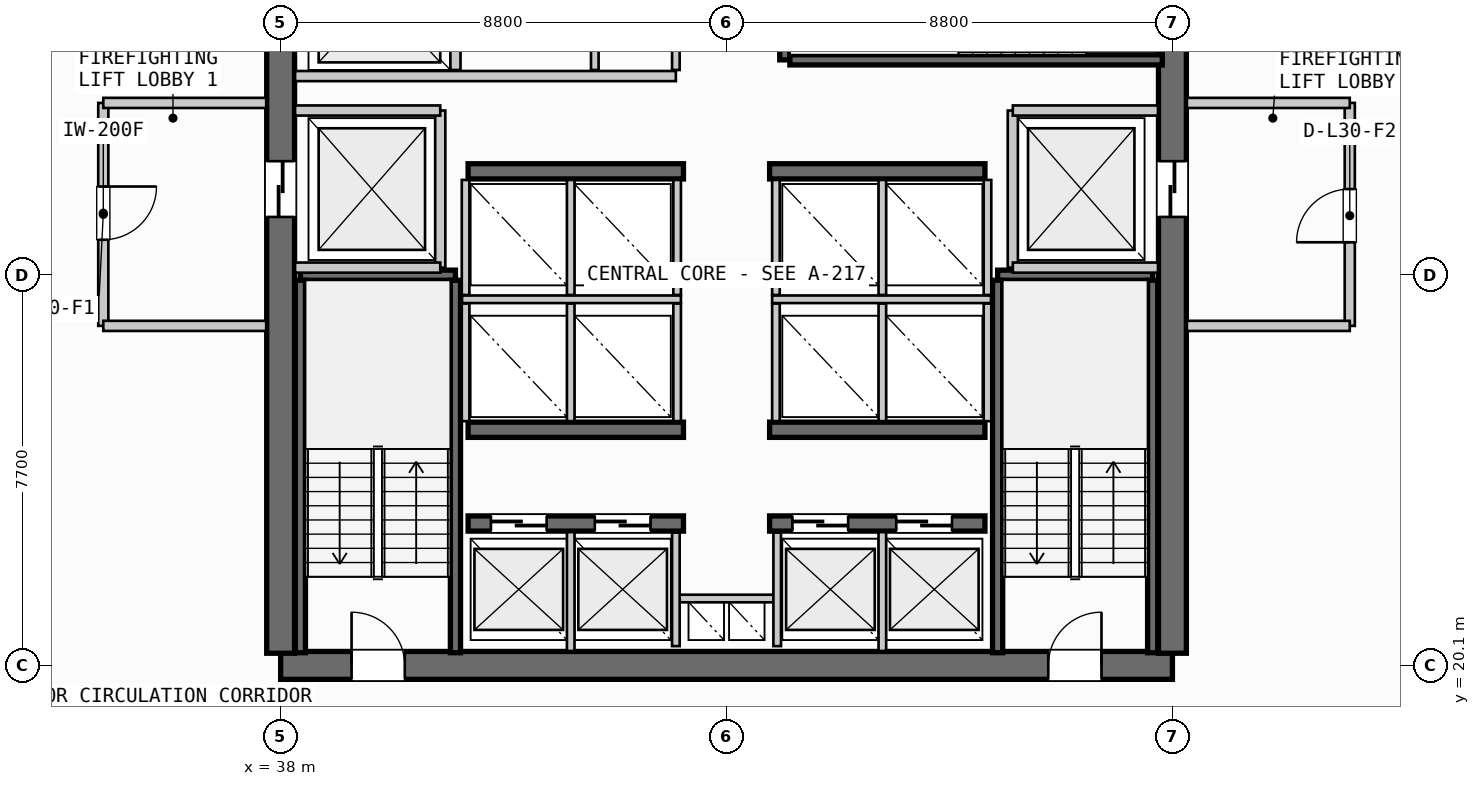
"""IFC4 building model, lengths in metres.
Left out: names, types, materials, properties, quantities, classifications, styles, units other than length and angle.
Written with IfcOpenShell. Run it as: python <this file> out.ifc"""

import sys

from ifc_helpers import new_model, si_unit, direction, frame, frame_2d, origin, place, context, subcontext, project, spatial, rectangle, extrude, source, transform, mapped, element, fill, save


model = new_model("IFC4")
c1 = context("Model", 3, precision=1e-05, world=origin(), true_north=direction((0.0, 1.0)))
c2 = subcontext(c1, "Body", "Model", "MODEL_VIEW")
j1 = project(units=[si_unit("LENGTHUNIT", "METRE"), si_unit("PLANEANGLEUNIT", "RADIAN")], contexts=[c1])
p1 = place(None, origin())
s1 = spatial("IfcSite", under=j1, at=p1, CompositionType="ELEMENT")
p2 = place(p1, origin())
s2 = spatial("IfcBuilding", under=s1, at=p2, CompositionType="ELEMENT")
p3 = place(p2, frame((0.0, 0.0, 121.6)))
s3 = spatial("IfcBuildingStorey", under=s2, at=p3, CompositionType="ELEMENT", Elevation=121.6)
p4 = place(p3, frame((38.0, 20.1, 0.0), z_axis=(0.0, 0.0, 1.0), x_axis=(1.0, 0.0, 0.0)))
e1 = element("IfcWall", 1, at=p4, inside=s3, PredefinedType="SHEAR", context=c2, shape_type="SweptSolid", body=[
    extrude(rectangle(XDim=17.6, YDim=0.55, at=frame_2d((8.8, 0.0))), origin(), (0.0, 0.0, 1.0), 3.35),
])
p5 = place(p4, frame((1.4, 0.0, 0.0)))
e2 = element("IfcOpeningElement", 2, at=p5, cuts=e1, PredefinedType="OPENING", context=c2, shape_type="SweptSolid", body=[
    extrude(rectangle(XDim=1.05, YDim=2.15, at=frame_2d((0.525, 1.075))), frame((0.0, 0.285, 0.0), z_axis=(0.0, -1.0, 0.0), x_axis=(1.0, 0.0, 0.0)), (0.0, 0.0, 1.0), 0.57),
])
p6 = place(p4, frame((15.15, 0.0, 0.0)))
e3 = element("IfcOpeningElement", 3, at=p6, cuts=e1, PredefinedType="OPENING", context=c2, shape_type="SweptSolid", body=[
    extrude(rectangle(XDim=1.05, YDim=2.15, at=frame_2d((0.525, 1.075))), frame((0.0, 0.285, 0.0), z_axis=(0.0, -1.0, 0.0), x_axis=(1.0, 0.0, 0.0)), (0.0, 0.0, 1.0), 0.57),
])
p7 = place(p3, frame((38.0, 35.26, 0.0), z_axis=(0.0, 0.0, 1.0), x_axis=(0.0, -1.0, 0.0)))
e4 = element("IfcWall", 4, at=p7, inside=s3, PredefinedType="SHEAR", context=c2, shape_type="SweptSolid", body=[
    extrude(rectangle(XDim=14.92, YDim=0.55, at=frame_2d((7.46, 0.0))), origin(), (0.0, 0.0, 1.0), 3.35),
])
p8 = place(p7, frame((5.21, 0.0, 0.0)))
e5 = element("IfcOpeningElement", 5, at=p8, cuts=e4, PredefinedType="OPENING", context=c2, shape_type="SweptSolid", body=[
    extrude(rectangle(XDim=1.1, YDim=2.2, at=frame_2d((0.55, 1.1))), frame((0.0, 0.285, 0.0), z_axis=(0.0, -1.0, 0.0), x_axis=(1.0, 0.0, 0.0)), (0.0, 0.0, 1.0), 0.57),
])
p9 = place(p3, frame((55.6, 20.34, 0.0), z_axis=(0.0, 0.0, 1.0), x_axis=(0.0, 1.0, 0.0)))
e6 = element("IfcWall", 6, at=p9, inside=s3, PredefinedType="SHEAR", context=c2, shape_type="SweptSolid", body=[
    extrude(rectangle(XDim=14.92, YDim=0.55, at=frame_2d((7.46, 0.0))), origin(), (0.0, 0.0, 1.0), 3.35),
])
p10 = place(p9, frame((12.71, 0.0, 0.0)))
e7 = element("IfcOpeningElement", 7, at=p10, cuts=e6, PredefinedType="OPENING", context=c2, shape_type="SweptSolid", body=[
    extrude(rectangle(XDim=1.05, YDim=2.15, at=frame_2d((0.525, 1.075))), frame((0.0, 0.285, 0.0), z_axis=(0.0, -1.0, 0.0), x_axis=(1.0, 0.0, 0.0)), (0.0, 0.0, 1.0), 0.57),
])
p11 = place(p9, frame((8.61, 0.0, 0.0)))
e8 = element("IfcOpeningElement", 8, at=p11, cuts=e6, PredefinedType="OPENING", context=c2, shape_type="SweptSolid", body=[
    extrude(rectangle(XDim=1.1, YDim=2.2, at=frame_2d((0.55, 1.1))), frame((0.0, 0.285, 0.0), z_axis=(0.0, -1.0, 0.0), x_axis=(1.0, 0.0, 0.0)), (0.0, 0.0, 1.0), 0.57),
])
p12 = place(p3, frame((41.7, 22.9, 0.0), z_axis=(0.0, 0.0, 1.0), x_axis=(1.0, 0.0, 0.0)))
e9 = element("IfcWall", 9, at=p12, inside=s3, PredefinedType="SHEAR", context=c2, shape_type="SweptSolid", body=[
    extrude(rectangle(XDim=4.25, YDim=0.3, at=frame_2d((2.125, 0.0))), origin(), (0.0, 0.0, 1.0), 3.35),
])
p13 = place(p12, frame((0.45, 0.0, 0.0)))
e10 = element("IfcOpeningElement", 10, at=p13, cuts=e9, PredefinedType="OPENING", context=c2, shape_type="SweptSolid", body=[
    extrude(rectangle(XDim=1.1, YDim=2.2, at=frame_2d((0.55, 1.1))), frame((0.0, 0.16, 0.0), z_axis=(0.0, -1.0, 0.0), x_axis=(1.0, 0.0, 0.0)), (0.0, 0.0, 1.0), 0.32),
])
p14 = place(p12, frame((2.5, 0.0, 0.0)))
e11 = element("IfcOpeningElement", 11, at=p14, cuts=e9, PredefinedType="OPENING", context=c2, shape_type="SweptSolid", body=[
    extrude(rectangle(XDim=1.1, YDim=2.2, at=frame_2d((0.55, 1.1))), frame((0.0, 0.16, 0.0), z_axis=(0.0, -1.0, 0.0), x_axis=(1.0, 0.0, 0.0)), (0.0, 0.0, 1.0), 0.32),
])
p15 = place(p3, frame((47.65, 22.9, 0.0), z_axis=(0.0, 0.0, 1.0), x_axis=(1.0, 0.0, 0.0)))
e12 = element("IfcWall", 12, at=p15, inside=s3, PredefinedType="SHEAR", context=c2, shape_type="SweptSolid", body=[
    extrude(rectangle(XDim=4.25, YDim=0.3, at=frame_2d((2.125, 0.0))), origin(), (0.0, 0.0, 1.0), 3.35),
])
p16 = place(p15, frame((0.45, 0.0, 0.0)))
e13 = element("IfcOpeningElement", 13, at=p16, cuts=e12, PredefinedType="OPENING", context=c2, shape_type="SweptSolid", body=[
    extrude(rectangle(XDim=1.1, YDim=2.2, at=frame_2d((0.55, 1.1))), frame((0.0, 0.16, 0.0), z_axis=(0.0, -1.0, 0.0), x_axis=(1.0, 0.0, 0.0)), (0.0, 0.0, 1.0), 0.32),
])
p17 = place(p15, frame((2.5, 0.0, 0.0)))
e14 = element("IfcOpeningElement", 14, at=p17, cuts=e12, PredefinedType="OPENING", context=c2, shape_type="SweptSolid", body=[
    extrude(rectangle(XDim=1.1, YDim=2.2, at=frame_2d((0.55, 1.1))), frame((0.0, 0.16, 0.0), z_axis=(0.0, -1.0, 0.0), x_axis=(1.0, 0.0, 0.0)), (0.0, 0.0, 1.0), 0.32),
])
for number, where, z_axis, x_axis in (
    (15, (41.7, 24.75, 0.0), (0.0, 0.0, 1.0), (1.0, 0.0, 0.0)),
    (16, (47.65, 24.75, 0.0), (0.0, 0.0, 1.0), (1.0, 0.0, 0.0)),
    (17, (41.7, 29.85, 0.0), (0.0, 0.0, 1.0), (1.0, 0.0, 0.0)),
    (18, (47.65, 29.85, 0.0), (0.0, 0.0, 1.0), (1.0, 0.0, 0.0)),
):
    element("IfcWall", number, at=place(p3, frame(where, z_axis=z_axis, x_axis=x_axis)), inside=s3, PredefinedType="SHEAR", context=c2, shape_type="SweptSolid", body=[
        extrude(rectangle(XDim=4.25, YDim=0.3, at=frame_2d((2.125, 0.0))), origin(), (0.0, 0.0, 1.0), 3.35),
    ])
p18 = place(p3, frame((38.39, 27.8, 0.0), z_axis=(0.0, 0.0, 1.0), x_axis=(1.0, 0.0, 0.0)))
e19 = element("IfcWall", 19, at=p18, inside=s3, PredefinedType="SHEAR", context=c2, shape_type="SweptSolid", body=[
    extrude(rectangle(XDim=3.06, YDim=0.2, at=frame_2d((1.53, 0.0))), origin(), (0.0, 0.0, 1.0), 3.35),
])
for number, where, z_axis, x_axis in (
    (20, (41.45, 27.7, 0.0), (0.0, 0.0, 1.0), (0.0, -1.0, 0.0)),
    (21, (38.39, 20.35, 0.0), (0.0, 0.0, 1.0), (0.0, 1.0, 0.0)),
):
    element("IfcWall", number, at=place(p3, frame(where, z_axis=z_axis, x_axis=x_axis)), inside=s3, PredefinedType="SHEAR", context=c2, shape_type="SweptSolid", body=[
        extrude(rectangle(XDim=7.35, YDim=0.2, at=frame_2d((3.675, 0.0))), origin(), (0.0, 0.0, 1.0), 3.35),
    ])
p19 = place(p3, frame((52.15, 27.8, 0.0), z_axis=(0.0, 0.0, 1.0), x_axis=(1.0, 0.0, 0.0)))
e22 = element("IfcWall", 22, at=p19, inside=s3, PredefinedType="SHEAR", context=c2, shape_type="SweptSolid", body=[
    extrude(rectangle(XDim=3.06, YDim=0.2, at=frame_2d((1.53, 0.0))), origin(), (0.0, 0.0, 1.0), 3.35),
])
for number, where, z_axis, x_axis in (
    (23, (55.21, 27.7, 0.0), (0.0, 0.0, 1.0), (0.0, -1.0, 0.0)),
    (24, (52.15, 20.35, 0.0), (0.0, 0.0, 1.0), (0.0, 1.0, 0.0)),
):
    element("IfcWall", number, at=place(p3, frame(where, z_axis=z_axis, x_axis=x_axis)), inside=s3, PredefinedType="SHEAR", context=c2, shape_type="SweptSolid", body=[
        extrude(rectangle(XDim=7.35, YDim=0.2, at=frame_2d((3.675, 0.0))), origin(), (0.0, 0.0, 1.0), 3.35),
    ])
p20 = place(p3, frame((47.95, 32.05, 0.0), z_axis=(0.0, 0.0, 1.0), x_axis=(0.0, 1.0, 0.0)))
e25 = element("IfcWall", 25, at=p20, inside=s3, PredefinedType="SHEAR", context=c2, shape_type="SweptSolid", body=[
    extrude(rectangle(XDim=3.06, YDim=0.2, at=frame_2d((1.53, 0.0))), origin(), (0.0, 0.0, 1.0), 3.35),
])
p21 = place(p3, frame((55.4, 32.05, 0.0), z_axis=(0.0, 0.0, 1.0), x_axis=(-1.0, 0.0, 0.0)))
e26 = element("IfcWall", 26, at=p21, inside=s3, PredefinedType="SHEAR", context=c2, shape_type="SweptSolid", body=[
    extrude(rectangle(XDim=7.35, YDim=0.2, at=frame_2d((3.675, 0.0))), origin(), (0.0, 0.0, 1.0), 3.35),
])
p22 = place(p3, frame((45.8, 21.42, 0.0), z_axis=(0.0, 0.0, 1.0), x_axis=(1.0, 0.0, 0.0)))
e27 = element("IfcWall", 27, at=p22, inside=s3, PredefinedType="PARTITIONING", context=c2, shape_type="SweptSolid", body=[
    extrude(rectangle(XDim=2.0, YDim=0.15, at=frame_2d((1.0, 0.0))), origin(), (0.0, 0.0, 1.0), 2.775),
])
for number, where, z_axis, x_axis in (
    (28, (45.8, 20.48, 0.0), (0.0, 0.0, 1.0), (0.0, 1.0, 0.0)),
    (29, (47.8, 20.48, 0.0), (0.0, 0.0, 1.0), (0.0, 1.0, 0.0)),
):
    element("IfcWall", number, at=place(p3, frame(where, z_axis=z_axis, x_axis=x_axis)), inside=s3, PredefinedType="PARTITIONING", context=c2, shape_type="SweptSolid", body=[
        extrude(rectangle(XDim=2.24, YDim=0.15, at=frame_2d((1.12, 0.0))), origin(), (0.0, 0.0, 1.0), 2.775),
    ])
p23 = place(p3, frame((41.15, 27.95, 0.0), z_axis=(0.0, 0.0, 1.0), x_axis=(0.0, 1.0, 0.0)))
e30 = element("IfcWall", 30, at=p23, inside=s3, PredefinedType="PARTITIONING", context=c2, shape_type="SweptSolid", body=[
    extrude(rectangle(XDim=3.1, YDim=0.2, at=frame_2d((1.55, 0.0))), origin(), (0.0, 0.0, 1.0), 2.775),
])
for number, where, z_axis, x_axis in (
    (31, (38.285, 27.95, 0.0), (0.0, 0.0, 1.0), (1.0, 0.0, 0.0)),
    (32, (38.285, 31.05, 0.0), (0.0, 0.0, 1.0), (1.0, 0.0, 0.0)),
):
    element("IfcWall", number, at=place(p3, frame(where, z_axis=z_axis, x_axis=x_axis)), inside=s3, PredefinedType="PARTITIONING", context=c2, shape_type="SweptSolid", body=[
        extrude(rectangle(XDim=2.865, YDim=0.2, at=frame_2d((1.433, 0.0))), origin(), (0.0, 0.0, 1.0), 2.775),
    ])
p24 = place(p3, frame((34.5, 31.2, 0.0), z_axis=(0.0, 0.0, 1.0), x_axis=(0.0, -1.0, 0.0)))
e33 = element("IfcWall", 33, at=p24, inside=s3, PredefinedType="PARTITIONING", context=c2, shape_type="SweptSolid", body=[
    extrude(rectangle(XDim=4.4, YDim=0.2, at=frame_2d((2.2, 0.0))), origin(), (0.0, 0.0, 1.0), 2.775),
])
p25 = place(p24, frame((1.65, 0.0, 0.0)))
e34 = element("IfcOpeningElement", 34, at=p25, cuts=e33, PredefinedType="OPENING", context=c2, shape_type="SweptSolid", body=[
    extrude(rectangle(XDim=1.05, YDim=2.15, at=frame_2d((0.525, 1.075))), frame((0.0, 0.11, 0.0), z_axis=(0.0, -1.0, 0.0), x_axis=(1.0, 0.0, 0.0)), (0.0, 0.0, 1.0), 0.22),
])
for number, where, z_axis, x_axis in (
    (35, (34.5, 26.8, 0.0), (0.0, 0.0, 1.0), (1.0, 0.0, 0.0)),
    (36, (34.5, 31.2, 0.0), (0.0, 0.0, 1.0), (1.0, 0.0, 0.0)),
):
    element("IfcWall", number, at=place(p3, frame(where, z_axis=z_axis, x_axis=x_axis)), inside=s3, PredefinedType="PARTITIONING", context=c2, shape_type="SweptSolid", body=[
        extrude(rectangle(XDim=3.215, YDim=0.2, at=frame_2d((1.607, 0.0))), origin(), (0.0, 0.0, 1.0), 2.775),
    ])
p26 = place(p3, frame((52.45, 27.95, 0.0), z_axis=(0.0, 0.0, 1.0), x_axis=(0.0, 1.0, 0.0)))
e37 = element("IfcWall", 37, at=p26, inside=s3, PredefinedType="PARTITIONING", context=c2, shape_type="SweptSolid", body=[
    extrude(rectangle(XDim=3.1, YDim=0.2, at=frame_2d((1.55, 0.0))), origin(), (0.0, 0.0, 1.0), 2.775),
])
for number, where, z_axis, x_axis in (
    (38, (52.45, 27.95, 0.0), (0.0, 0.0, 1.0), (1.0, 0.0, 0.0)),
    (39, (52.45, 31.05, 0.0), (0.0, 0.0, 1.0), (1.0, 0.0, 0.0)),
):
    element("IfcWall", number, at=place(p3, frame(where, z_axis=z_axis, x_axis=x_axis)), inside=s3, PredefinedType="PARTITIONING", context=c2, shape_type="SweptSolid", body=[
        extrude(rectangle(XDim=2.865, YDim=0.2, at=frame_2d((1.433, 0.0))), origin(), (0.0, 0.0, 1.0), 2.775),
    ])
p27 = place(p3, frame((59.1, 26.8, 0.0), z_axis=(0.0, 0.0, 1.0), x_axis=(0.0, 1.0, 0.0)))
e40 = element("IfcWall", 40, at=p27, inside=s3, PredefinedType="PARTITIONING", context=c2, shape_type="SweptSolid", body=[
    extrude(rectangle(XDim=4.4, YDim=0.2, at=frame_2d((2.2, 0.0))), origin(), (0.0, 0.0, 1.0), 2.775),
])
p28 = place(p27, frame((1.65, 0.0, 0.0)))
e41 = element("IfcOpeningElement", 41, at=p28, cuts=e40, PredefinedType="OPENING", context=c2, shape_type="SweptSolid", body=[
    extrude(rectangle(XDim=1.05, YDim=2.15, at=frame_2d((0.525, 1.075))), frame((0.0, 0.11, 0.0), z_axis=(0.0, -1.0, 0.0), x_axis=(1.0, 0.0, 0.0)), (0.0, 0.0, 1.0), 0.22),
])
for number, where, z_axis, x_axis in (
    (42, (55.885, 26.8, 0.0), (0.0, 0.0, 1.0), (1.0, 0.0, 0.0)),
    (43, (55.885, 31.2, 0.0), (0.0, 0.0, 1.0), (1.0, 0.0, 0.0)),
):
    element("IfcWall", number, at=place(p3, frame(where, z_axis=z_axis, x_axis=x_axis)), inside=s3, PredefinedType="PARTITIONING", context=c2, shape_type="SweptSolid", body=[
        extrude(rectangle(XDim=3.215, YDim=0.2, at=frame_2d((1.607, 0.0))), origin(), (0.0, 0.0, 1.0), 2.775),
    ])
for number, where, z_axis, x_axis in (
    (44, (43.725, 20.385, 0.0), (0.0, 0.0, 1.0), (0.0, 1.0, 0.0)),
    (45, (49.875, 20.385, 0.0), (0.0, 0.0, 1.0), (0.0, 1.0, 0.0)),
):
    element("IfcWall", number, at=place(p3, frame(where, z_axis=z_axis, x_axis=x_axis)), inside=s3, PredefinedType="PARTITIONING", context=c2, shape_type="SweptSolid", body=[
        extrude(rectangle(XDim=2.345, YDim=0.15, at=frame_2d((1.172, 0.0))), origin(), (0.0, 0.0, 1.0), 2.775),
    ])
p29 = place(p3, frame((41.58, 27.325, 0.0), z_axis=(0.0, 0.0, 1.0), x_axis=(1.0, 0.0, 0.0)))
e46 = element("IfcWall", 46, at=p29, inside=s3, PredefinedType="PARTITIONING", context=c2, shape_type="SweptSolid", body=[
    extrude(rectangle(XDim=4.32, YDim=0.15, at=frame_2d((2.16, 0.0))), origin(), (0.0, 0.0, 1.0), 2.775),
])
p30 = place(p3, frame((47.7, 27.325, 0.0), z_axis=(0.0, 0.0, 1.0), x_axis=(1.0, 0.0, 0.0)))
e47 = element("IfcWall", 47, at=p30, inside=s3, PredefinedType="PARTITIONING", context=c2, shape_type="SweptSolid", body=[
    extrude(rectangle(XDim=4.32, YDim=0.15, at=frame_2d((2.16, 0.0))), origin(), (0.0, 0.0, 1.0), 2.775),
])
for number, where, z_axis, x_axis in (
    (48, (41.65, 24.92, 0.0), (0.0, 0.0, 1.0), (0.0, 1.0, 0.0)),
    (49, (43.725, 24.92, 0.0), (0.0, 0.0, 1.0), (0.0, 1.0, 0.0)),
    (50, (45.825, 24.92, 0.0), (0.0, 0.0, 1.0), (0.0, 1.0, 0.0)),
    (51, (47.775, 24.92, 0.0), (0.0, 0.0, 1.0), (0.0, 1.0, 0.0)),
    (52, (49.875, 24.92, 0.0), (0.0, 0.0, 1.0), (0.0, 1.0, 0.0)),
    (53, (51.95, 24.92, 0.0), (0.0, 0.0, 1.0), (0.0, 1.0, 0.0)),
):
    element("IfcWall", number, at=place(p3, frame(where, z_axis=z_axis, x_axis=x_axis)), inside=s3, PredefinedType="PARTITIONING", context=c2, shape_type="SweptSolid", body=[
        extrude(rectangle(XDim=2.32, YDim=0.15, at=frame_2d((1.16, 0.0))), origin(), (0.0, 0.0, 1.0), 2.775),
    ])
for number, where, z_axis, x_axis in (
    (54, (41.65, 27.41, 0.0), (0.0, 0.0, 1.0), (0.0, 1.0, 0.0)),
    (55, (43.725, 27.41, 0.0), (0.0, 0.0, 1.0), (0.0, 1.0, 0.0)),
    (56, (45.825, 27.41, 0.0), (0.0, 0.0, 1.0), (0.0, 1.0, 0.0)),
    (57, (47.775, 27.41, 0.0), (0.0, 0.0, 1.0), (0.0, 1.0, 0.0)),
    (58, (49.875, 27.41, 0.0), (0.0, 0.0, 1.0), (0.0, 1.0, 0.0)),
    (59, (51.95, 27.41, 0.0), (0.0, 0.0, 1.0), (0.0, 1.0, 0.0)),
):
    element("IfcWall", number, at=place(p3, frame(where, z_axis=z_axis, x_axis=x_axis)), inside=s3, PredefinedType="PARTITIONING", context=c2, shape_type="SweptSolid", body=[
        extrude(rectangle(XDim=2.27, YDim=0.15, at=frame_2d((1.135, 0.0))), origin(), (0.0, 0.0, 1.0), 2.775),
    ])
p31 = place(p3, frame((41.45, 31.85, 0.0), z_axis=(0.0, 0.0, 1.0), x_axis=(0.0, 1.0, 0.0)))
e60 = element("IfcWall", 60, at=p31, inside=s3, PredefinedType="PARTITIONING", context=c2, shape_type="SweptSolid", body=[
    extrude(rectangle(XDim=3.365, YDim=0.2, at=frame_2d((1.683, 0.0))), origin(), (0.0, 0.0, 1.0), 2.775),
])
p32 = place(p3, frame((38.285, 31.73, 0.0), z_axis=(0.0, 0.0, 1.0), x_axis=(1.0, 0.0, 0.0)))
e61 = element("IfcWall", 61, at=p32, inside=s3, PredefinedType="PARTITIONING", context=c2, shape_type="SweptSolid", body=[
    extrude(rectangle(XDim=7.515, YDim=0.2, at=frame_2d((3.758, 0.0))), origin(), (0.0, 0.0, 1.0), 2.775),
])
p33 = place(p3, frame((45.8, 31.85, 0.0), z_axis=(0.0, 0.0, 1.0), x_axis=(0.0, 1.0, 0.0)))
e62 = element("IfcWall", 62, at=p33, inside=s3, PredefinedType="PARTITIONING", context=c2, shape_type="SweptSolid", body=[
    extrude(rectangle(XDim=3.365, YDim=0.15, at=frame_2d((1.683, 0.0))), origin(), (0.0, 0.0, 1.0), 2.775),
])
p34 = place(p3, frame((44.2, 31.85, 0.0), z_axis=(0.0, 0.0, 1.0), x_axis=(0.0, 1.0, 0.0)))
e63 = element("IfcWall", 63, at=p34, inside=s3, PredefinedType="PLUMBINGWALL", context=c2, shape_type="SweptSolid", body=[
    extrude(rectangle(XDim=3.365, YDim=0.15, at=frame_2d((1.683, 0.0))), origin(), (0.0, 0.0, 1.0), 2.775),
])
m1 = source(origin(), c2, "Body", "SweptSolid", [
    extrude(rectangle(XDim=1.05, YDim=2.15, at=frame_2d((0.525, 1.075))), frame((0.0, 0.025, 0.0), z_axis=(0.0, -1.0, 0.0), x_axis=(1.0, 0.0, 0.0)), (0.0, 0.0, 1.0), 0.05),
])
p35 = place(p5, origin())
e64 = element("IfcDoor", 64, at=p35, inside=s3, OperationType="SINGLE_SWING_LEFT", PredefinedType="DOOR", context=c2, shape_type="MappedRepresentation", body=[
    mapped(m1, transform((0.0, 0.0, 0.0), scale=1.0)),
])
fill(e2, e64)
p36 = place(p6, origin())
e65 = element("IfcDoor", 65, at=p36, inside=s3, OperationType="SINGLE_SWING_RIGHT", PredefinedType="DOOR", context=c2, shape_type="MappedRepresentation", body=[
    mapped(m1, transform((0.0, 0.0, 0.0), scale=1.0)),
])
fill(e3, e65)
m2 = source(origin(), c2, "Body", "SweptSolid", [
    extrude(rectangle(XDim=1.1, YDim=2.2, at=frame_2d((0.55, 1.1))), frame((0.0, 0.025, 0.0), z_axis=(0.0, -1.0, 0.0), x_axis=(1.0, 0.0, 0.0)), (0.0, 0.0, 1.0), 0.05),
])
p37 = place(p8, origin())
e66 = element("IfcDoor", 66, at=p37, inside=s3, OperationType="SLIDING_TO_LEFT", PredefinedType="DOOR", context=c2, shape_type="MappedRepresentation", body=[
    mapped(m2, transform((0.0, 0.0, 0.0), scale=1.0)),
])
fill(e5, e66)
p38 = place(p11, origin())
e67 = element("IfcDoor", 67, at=p38, inside=s3, OperationType="SLIDING_TO_RIGHT", PredefinedType="DOOR", context=c2, shape_type="MappedRepresentation", body=[
    mapped(m2, transform((0.0, 0.0, 0.0), scale=1.0)),
])
fill(e8, e67)
p39 = place(p13, origin())
e68 = element("IfcDoor", 68, at=p39, inside=s3, OperationType="SLIDING_TO_LEFT", PredefinedType="DOOR", context=c2, shape_type="MappedRepresentation", body=[
    mapped(m2, transform((0.0, 0.0, 0.0), scale=1.0)),
])
fill(e10, e68)
p40 = place(p14, origin())
e69 = element("IfcDoor", 69, at=p40, inside=s3, OperationType="SLIDING_TO_LEFT", PredefinedType="DOOR", context=c2, shape_type="MappedRepresentation", body=[
    mapped(m2, transform((0.0, 0.0, 0.0), scale=1.0)),
])
fill(e11, e69)
p41 = place(p16, origin())
e70 = element("IfcDoor", 70, at=p41, inside=s3, OperationType="SLIDING_TO_LEFT", PredefinedType="DOOR", context=c2, shape_type="MappedRepresentation", body=[
    mapped(m2, transform((0.0, 0.0, 0.0), scale=1.0)),
])
fill(e13, e70)
p42 = place(p17, origin())
e71 = element("IfcDoor", 71, at=p42, inside=s3, OperationType="SLIDING_TO_LEFT", PredefinedType="DOOR", context=c2, shape_type="MappedRepresentation", body=[
    mapped(m2, transform((0.0, 0.0, 0.0), scale=1.0)),
])
fill(e14, e71)
p43 = place(p25, origin())
e72 = element("IfcDoor", 72, at=p43, inside=s3, OperationType="SINGLE_SWING_LEFT", PredefinedType="DOOR", context=c2, shape_type="MappedRepresentation", body=[
    mapped(m1, transform((0.0, 0.0, 0.0), scale=1.0)),
])
fill(e34, e72)
p44 = place(p28, origin())
e73 = element("IfcDoor", 73, at=p44, inside=s3, OperationType="SINGLE_SWING_LEFT", PredefinedType="DOOR", context=c2, shape_type="MappedRepresentation", body=[
    mapped(m1, transform((0.0, 0.0, 0.0), scale=1.0)),
])
fill(e41, e73)
save(model, sys.argv[1])
